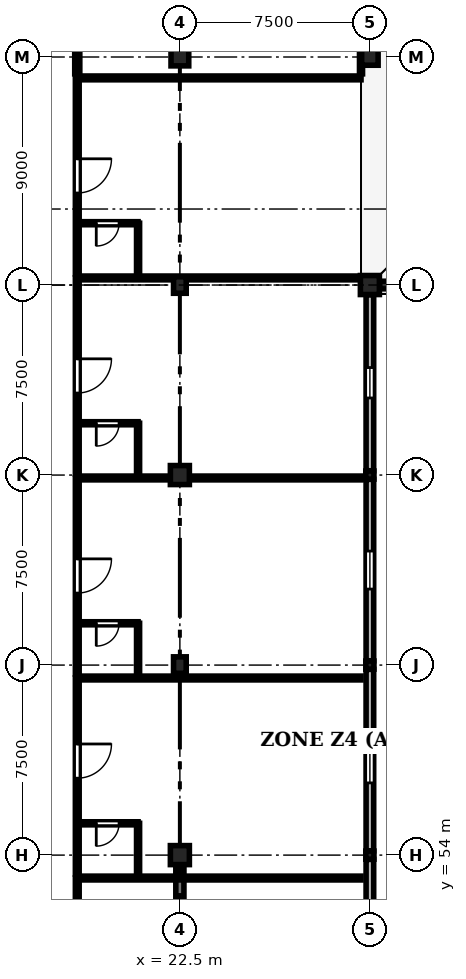
"""IFC4 building model, lengths in metres.
Left out: names, types, materials, properties, quantities, classifications, styles, units other than length and angle.
Written with IfcOpenShell. Run it as: python <this file> out.ifc"""

import sys

from ifc_helpers import new_model, si_unit, direction, frame, frame_2d, origin, origin_2d, place, context, subcontext, project, spatial, rectangle, extrude, element, fill, save


model = new_model("IFC4")
c1 = context("Model", 3, precision=1e-05, world=origin(), true_north=direction((0.0, 1.0)))
c2 = subcontext(c1, "Body", "Model", "MODEL_VIEW")
j1 = project(units=[si_unit("LENGTHUNIT", "METRE"), si_unit("PLANEANGLEUNIT", "RADIAN")], contexts=[c1])
p1 = place(None, origin())
s1 = spatial("IfcSite", under=j1, at=p1, CompositionType="ELEMENT")
p2 = place(p1, origin())
s2 = spatial("IfcBuilding", under=s1, at=p2, CompositionType="ELEMENT")
p3 = place(p2, frame((0.0, 0.0, 14.1)))
s3 = spatial("IfcBuildingStorey", under=s2, at=p3, CompositionType="ELEMENT", Elevation=14.1)
p4 = place(p3, frame((22.5, 54.0, 0.0), z_axis=(0.0, 0.0, 1.0), x_axis=(1.0, 0.0, 0.0)))
e1 = element("IfcColumn", 1, at=p4, inside=s3, PredefinedType="COLUMN", context=c2, shape_type="SweptSolid", body=[
    extrude(rectangle(XDim=0.75, YDim=0.75, at=origin_2d()), origin(), (0.0, 0.0, 1.0), 3.75),
])
p5 = place(p3, frame((22.5, 61.5, 0.0), z_axis=(0.0, 0.0, 1.0), x_axis=(1.0, 0.0, 0.0)))
e2 = element("IfcColumn", 2, at=p5, inside=s3, PredefinedType="COLUMN", context=c2, shape_type="SweptSolid", body=[
    extrude(rectangle(XDim=0.5, YDim=0.65, at=origin_2d()), origin(), (0.0, 0.0, 1.0), 3.75),
])
p6 = place(p3, frame((22.5, 69.0, 0.0), z_axis=(0.0, 0.0, 1.0), x_axis=(1.0, 0.0, 0.0)))
e3 = element("IfcColumn", 3, at=p6, inside=s3, PredefinedType="COLUMN", context=c2, shape_type="SweptSolid", body=[
    extrude(rectangle(XDim=0.75, YDim=0.75, at=origin_2d()), origin(), (0.0, 0.0, 1.0), 3.75),
])
p7 = place(p3, frame((22.5, 76.5, 0.0), z_axis=(0.0, 0.0, 1.0), x_axis=(1.0, 0.0, 0.0)))
e4 = element("IfcColumn", 4, at=p7, inside=s3, PredefinedType="COLUMN", context=c2, shape_type="SweptSolid", body=[
    extrude(rectangle(XDim=0.5, YDim=0.65, at=origin_2d()), origin(), (0.0, 0.0, 1.0), 3.75),
])
p8 = place(p3, frame((22.5, 85.5, 0.0), z_axis=(0.0, 0.0, 1.0), x_axis=(1.0, 0.0, 0.0)))
e5 = element("IfcColumn", 5, at=p8, inside=s3, PredefinedType="COLUMN", context=c2, shape_type="SweptSolid", body=[
    extrude(rectangle(XDim=0.7, YDim=0.7, at=origin_2d()), origin(), (0.0, 0.0, 1.0), 3.75),
])
for number, where, z_axis, x_axis in (
    (6, (30.0, 54.0, 0.0), (0.0, 0.0, 1.0), (1.0, 0.0, 0.0)),
    (7, (30.0, 61.5, 0.0), (0.0, 0.0, 1.0), (1.0, 0.0, 0.0)),
    (8, (30.0, 69.0, 0.0), (0.0, 0.0, 1.0), (1.0, 0.0, 0.0)),
):
    element("IfcColumn", number, at=place(p3, frame(where, z_axis=z_axis, x_axis=x_axis)), inside=s3, PredefinedType="COLUMN", context=c2, shape_type="SweptSolid", body=[
        extrude(rectangle(XDim=0.32, YDim=0.32, at=origin_2d()), origin(), (0.0, 0.0, 1.0), 3.75),
    ])
p9 = place(p3, frame((30.0, 76.5, 0.0), z_axis=(0.0, 0.0, 1.0), x_axis=(1.0, 0.0, 0.0)))
e9 = element("IfcColumn", 9, at=p9, inside=s3, PredefinedType="COLUMN", context=c2, shape_type="SweptSolid", body=[
    extrude(rectangle(XDim=0.75, YDim=0.75, at=origin_2d()), origin(), (0.0, 0.0, 1.0), 3.75),
])
p10 = place(p3, frame((30.0, 85.5, 0.0), z_axis=(0.0, 0.0, 1.0), x_axis=(1.0, 0.0, 0.0)))
e10 = element("IfcColumn", 10, at=p10, inside=s3, PredefinedType="COLUMN", context=c2, shape_type="SweptSolid", body=[
    extrude(rectangle(XDim=0.65, YDim=0.65, at=origin_2d()), origin(), (0.0, 0.0, 1.0), 3.75),
])
p11 = place(p3, frame((22.5, 46.95, 0.0), z_axis=(0.0, 0.0, 1.0), x_axis=(0.0, 1.0, 0.0)))
e11 = element("IfcWall", 11, at=p11, inside=s3, PredefinedType="SHEAR", context=c2, shape_type="SweptSolid", body=[
    extrude(rectangle(XDim=6.6, YDim=0.32, at=frame_2d((3.3, 0.0))), origin(), (0.0, 0.0, 1.0), 2.92),
])
p12 = place(p3, frame((30.0, 53.83, 0.0), z_axis=(0.0, 0.0, 1.0), x_axis=(0.0, -1.0, 0.0)))
e12 = element("IfcWall", 12, at=p12, inside=s3, PredefinedType="STANDARD", context=c2, shape_type="SweptSolid", body=[
    extrude(rectangle(XDim=7.16, YDim=0.3, at=frame_2d((3.58, 0.0))), origin(), (0.0, 0.0, 1.0), 2.87),
])
p13 = place(p12, frame((2.38, 0.0, 0.9)))
e13 = element("IfcOpeningElement", 13, at=p13, cuts=e12, PredefinedType="OPENING", context=c2, shape_type="SweptSolid", body=[
    extrude(rectangle(XDim=2.4, YDim=1.69, at=frame_2d((1.2, 0.845))), frame((0.0, 0.16, 0.0), z_axis=(0.0, -1.0, 0.0), x_axis=(1.0, 0.0, 0.0)), (0.0, 0.0, 1.0), 0.32),
])
p14 = place(p3, frame((30.0, 61.33, 0.0), z_axis=(0.0, 0.0, 1.0), x_axis=(0.0, -1.0, 0.0)))
e14 = element("IfcWall", 14, at=p14, inside=s3, PredefinedType="STANDARD", context=c2, shape_type="SweptSolid", body=[
    extrude(rectangle(XDim=7.16, YDim=0.3, at=frame_2d((3.58, 0.0))), origin(), (0.0, 0.0, 1.0), 2.87),
])
p15 = place(p14, frame((2.68, 0.0, 0.9)))
e15 = element("IfcOpeningElement", 15, at=p15, cuts=e14, PredefinedType="OPENING", context=c2, shape_type="SweptSolid", body=[
    extrude(rectangle(XDim=1.8, YDim=1.69, at=frame_2d((0.9, 0.845))), frame((0.0, 0.16, 0.0), z_axis=(0.0, -1.0, 0.0), x_axis=(1.0, 0.0, 0.0)), (0.0, 0.0, 1.0), 0.32),
])
p16 = place(p3, frame((30.0, 68.83, 0.0), z_axis=(0.0, 0.0, 1.0), x_axis=(0.0, -1.0, 0.0)))
e16 = element("IfcWall", 16, at=p16, inside=s3, PredefinedType="STANDARD", context=c2, shape_type="SweptSolid", body=[
    extrude(rectangle(XDim=7.16, YDim=0.3, at=frame_2d((3.58, 0.0))), origin(), (0.0, 0.0, 1.0), 2.87),
])
p17 = place(p16, frame((2.83, 0.0, 0.9)))
e17 = element("IfcOpeningElement", 17, at=p17, cuts=e16, PredefinedType="OPENING", context=c2, shape_type="SweptSolid", body=[
    extrude(rectangle(XDim=1.5, YDim=1.69, at=frame_2d((0.75, 0.845))), frame((0.0, 0.16, 0.0), z_axis=(0.0, -1.0, 0.0), x_axis=(1.0, 0.0, 0.0)), (0.0, 0.0, 1.0), 0.32),
])
p18 = place(p3, frame((30.0, 76.115, 0.0), z_axis=(0.0, 0.0, 1.0), x_axis=(0.0, -1.0, 0.0)))
e18 = element("IfcWall", 18, at=p18, inside=s3, PredefinedType="STANDARD", context=c2, shape_type="SweptSolid", body=[
    extrude(rectangle(XDim=6.945, YDim=0.3, at=frame_2d((3.473, 0.0))), origin(), (0.0, 0.0, 1.0), 2.87),
])
p19 = place(p18, frame((2.873, 0.0, 0.9)))
e19 = element("IfcOpeningElement", 19, at=p19, cuts=e18, PredefinedType="OPENING", context=c2, shape_type="SweptSolid", body=[
    extrude(rectangle(XDim=1.2, YDim=1.69, at=frame_2d((0.6, 0.845))), frame((0.0, 0.16, 0.0), z_axis=(0.0, -1.0, 0.0), x_axis=(1.0, 0.0, 0.0)), (0.0, 0.0, 1.0), 0.32),
])
p20 = place(p3, frame((37.265, 76.5, 0.0), z_axis=(0.0, 0.0, 1.0), x_axis=(-1.0, 0.0, 0.0)))
e20 = element("IfcWall", 20, at=p20, inside=s3, PredefinedType="STANDARD", context=c2, shape_type="SweptSolid", body=[
    extrude(rectangle(XDim=6.88, YDim=0.3, at=frame_2d((3.44, 0.0))), origin(), (0.0, 0.0, 1.0), 3.47),
])
p21 = place(p20, frame((2.24, 0.0, 1.1)))
e21 = element("IfcOpeningElement", 21, at=p21, cuts=e20, PredefinedType="OPENING", context=c2, shape_type="SweptSolid", body=[
    extrude(rectangle(XDim=2.4, YDim=1.2, at=frame_2d((1.2, 0.6))), frame((0.0, 0.16, 0.0), z_axis=(0.0, -1.0, 0.0), x_axis=(1.0, 0.0, 0.0)), (0.0, 0.0, 1.0), 0.32),
])
p22 = place(p3, frame((18.45, 53.095, 0.0), z_axis=(0.0, 0.0, 1.0), x_axis=(0.0, -1.0, 0.0)))
e22 = element("IfcWall", 22, at=p22, inside=s3, PredefinedType="PARTITIONING", context=c2, shape_type="SweptSolid", body=[
    extrude(rectangle(XDim=7.735, YDim=0.15, at=frame_2d((3.867, 0.0))), origin(), (0.0, 0.0, 1.0), 3.455),
])
p23 = place(p22, frame((2.015, 0.0, 0.0)))
e23 = element("IfcOpeningElement", 23, at=p23, cuts=e22, PredefinedType="OPENING", context=c2, shape_type="SweptSolid", body=[
    extrude(rectangle(XDim=1.35, YDim=2.25, at=frame_2d((0.675, 1.125))), frame((0.0, 0.085, 0.0), z_axis=(0.0, -1.0, 0.0), x_axis=(1.0, 0.0, 0.0)), (0.0, 0.0, 1.0), 0.17),
])
p24 = place(p3, frame((18.45, 60.99, 0.0), z_axis=(0.0, 0.0, 1.0), x_axis=(0.0, -1.0, 0.0)))
e24 = element("IfcWall", 24, at=p24, inside=s3, PredefinedType="PARTITIONING", context=c2, shape_type="SweptSolid", body=[
    extrude(rectangle(XDim=7.735, YDim=0.15, at=frame_2d((3.868, 0.0))), origin(), (0.0, 0.0, 1.0), 3.455),
])
p25 = place(p24, frame((2.604, 0.0, 0.0)))
e25 = element("IfcOpeningElement", 25, at=p25, cuts=e24, PredefinedType="OPENING", context=c2, shape_type="SweptSolid", body=[
    extrude(rectangle(XDim=1.35, YDim=2.25, at=frame_2d((0.675, 1.125))), frame((0.0, 0.085, 0.0), z_axis=(0.0, -1.0, 0.0), x_axis=(1.0, 0.0, 0.0)), (0.0, 0.0, 1.0), 0.17),
])
p26 = place(p3, frame((20.85, 55.255, 0.0), z_axis=(0.0, 0.0, 1.0), x_axis=(-1.0, 0.0, 0.0)))
e26 = element("IfcWall", 26, at=p26, inside=s3, PredefinedType="PARTITIONING", context=c2, shape_type="SweptSolid", body=[
    extrude(rectangle(XDim=2.4, YDim=0.12, at=frame_2d((1.2, 0.0))), origin(), (0.0, 0.0, 1.0), 3.455),
])
p27 = place(p26, frame((0.75, 0.0, 0.0)))
e27 = element("IfcOpeningElement", 27, at=p27, cuts=e26, PredefinedType="OPENING", context=c2, shape_type="SweptSolid", body=[
    extrude(rectangle(XDim=0.9, YDim=2.1, at=frame_2d((0.45, 1.05))), frame((0.0, 0.07, 0.0), z_axis=(0.0, -1.0, 0.0), x_axis=(1.0, 0.0, 0.0)), (0.0, 0.0, 1.0), 0.14),
])
p28 = place(p3, frame((20.85, 53.255, 0.0), z_axis=(0.0, 0.0, 1.0), x_axis=(0.0, 1.0, 0.0)))
e28 = element("IfcWall", 28, at=p28, inside=s3, PredefinedType="PARTITIONING", context=c2, shape_type="SweptSolid", body=[
    extrude(rectangle(XDim=2.0, YDim=0.12, at=frame_2d((1.0, 0.0))), origin(), (0.0, 0.0, 1.0), 3.455),
])
p29 = place(p3, frame((18.45, 68.885, 0.0), z_axis=(0.0, 0.0, 1.0), x_axis=(0.0, -1.0, 0.0)))
e29 = element("IfcWall", 29, at=p29, inside=s3, PredefinedType="PARTITIONING", context=c2, shape_type="SweptSolid", body=[
    extrude(rectangle(XDim=7.735, YDim=0.15, at=frame_2d((3.868, 0.0))), origin(), (0.0, 0.0, 1.0), 3.455),
])
p30 = place(p29, frame((3.192, 0.0, 0.0)))
e30 = element("IfcOpeningElement", 30, at=p30, cuts=e29, PredefinedType="OPENING", context=c2, shape_type="SweptSolid", body=[
    extrude(rectangle(XDim=1.35, YDim=2.25, at=frame_2d((0.675, 1.125))), frame((0.0, 0.085, 0.0), z_axis=(0.0, -1.0, 0.0), x_axis=(1.0, 0.0, 0.0)), (0.0, 0.0, 1.0), 0.17),
])
p31 = place(p3, frame((20.85, 63.15, 0.0), z_axis=(0.0, 0.0, 1.0), x_axis=(-1.0, 0.0, 0.0)))
e31 = element("IfcWall", 31, at=p31, inside=s3, PredefinedType="PARTITIONING", context=c2, shape_type="SweptSolid", body=[
    extrude(rectangle(XDim=2.4, YDim=0.12, at=frame_2d((1.2, 0.0))), origin(), (0.0, 0.0, 1.0), 3.455),
])
p32 = place(p31, frame((0.75, 0.0, 0.0)))
e32 = element("IfcOpeningElement", 32, at=p32, cuts=e31, PredefinedType="OPENING", context=c2, shape_type="SweptSolid", body=[
    extrude(rectangle(XDim=0.9, YDim=2.1, at=frame_2d((0.45, 1.05))), frame((0.0, 0.07, 0.0), z_axis=(0.0, -1.0, 0.0), x_axis=(1.0, 0.0, 0.0)), (0.0, 0.0, 1.0), 0.14),
])
p33 = place(p3, frame((20.85, 61.15, 0.0), z_axis=(0.0, 0.0, 1.0), x_axis=(0.0, 1.0, 0.0)))
e33 = element("IfcWall", 33, at=p33, inside=s3, PredefinedType="PARTITIONING", context=c2, shape_type="SweptSolid", body=[
    extrude(rectangle(XDim=2.0, YDim=0.12, at=frame_2d((1.0, 0.0))), origin(), (0.0, 0.0, 1.0), 3.455),
])
p34 = place(p3, frame((18.45, 76.78, 0.0), z_axis=(0.0, 0.0, 1.0), x_axis=(0.0, -1.0, 0.0)))
e34 = element("IfcWall", 34, at=p34, inside=s3, PredefinedType="PARTITIONING", context=c2, shape_type="SweptSolid", body=[
    extrude(rectangle(XDim=7.735, YDim=0.15, at=frame_2d((3.868, 0.0))), origin(), (0.0, 0.0, 1.0), 3.455),
])
p35 = place(p34, frame((3.192, 0.0, 0.0)))
e35 = element("IfcOpeningElement", 35, at=p35, cuts=e34, PredefinedType="OPENING", context=c2, shape_type="SweptSolid", body=[
    extrude(rectangle(XDim=1.35, YDim=2.25, at=frame_2d((0.675, 1.125))), frame((0.0, 0.085, 0.0), z_axis=(0.0, -1.0, 0.0), x_axis=(1.0, 0.0, 0.0)), (0.0, 0.0, 1.0), 0.17),
])
p36 = place(p3, frame((20.85, 71.045, 0.0), z_axis=(0.0, 0.0, 1.0), x_axis=(-1.0, 0.0, 0.0)))
e36 = element("IfcWall", 36, at=p36, inside=s3, PredefinedType="PARTITIONING", context=c2, shape_type="SweptSolid", body=[
    extrude(rectangle(XDim=2.4, YDim=0.12, at=frame_2d((1.2, 0.0))), origin(), (0.0, 0.0, 1.0), 3.455),
])
p37 = place(p36, frame((0.75, 0.0, 0.0)))
e37 = element("IfcOpeningElement", 37, at=p37, cuts=e36, PredefinedType="OPENING", context=c2, shape_type="SweptSolid", body=[
    extrude(rectangle(XDim=0.9, YDim=2.1, at=frame_2d((0.45, 1.05))), frame((0.0, 0.07, 0.0), z_axis=(0.0, -1.0, 0.0), x_axis=(1.0, 0.0, 0.0)), (0.0, 0.0, 1.0), 0.14),
])
p38 = place(p3, frame((20.85, 69.045, 0.0), z_axis=(0.0, 0.0, 1.0), x_axis=(0.0, 1.0, 0.0)))
e38 = element("IfcWall", 38, at=p38, inside=s3, PredefinedType="PARTITIONING", context=c2, shape_type="SweptSolid", body=[
    extrude(rectangle(XDim=2.0, YDim=0.12, at=frame_2d((1.0, 0.0))), origin(), (0.0, 0.0, 1.0), 3.455),
])
p39 = place(p3, frame((18.45, 84.675, 0.0), z_axis=(0.0, 0.0, 1.0), x_axis=(0.0, -1.0, 0.0)))
e39 = element("IfcWall", 39, at=p39, inside=s3, PredefinedType="PARTITIONING", context=c2, shape_type="SweptSolid", body=[
    extrude(rectangle(XDim=7.735, YDim=0.15, at=frame_2d((3.868, 0.0))), origin(), (0.0, 0.0, 1.0), 3.055),
])
p40 = place(p39, frame((3.192, 0.0, 0.0)))
e40 = element("IfcOpeningElement", 40, at=p40, cuts=e39, PredefinedType="OPENING", context=c2, shape_type="SweptSolid", body=[
    extrude(rectangle(XDim=1.35, YDim=2.25, at=frame_2d((0.675, 1.125))), frame((0.0, 0.085, 0.0), z_axis=(0.0, -1.0, 0.0), x_axis=(1.0, 0.0, 0.0)), (0.0, 0.0, 1.0), 0.17),
])
p41 = place(p3, frame((20.85, 78.94, 0.0), z_axis=(0.0, 0.0, 1.0), x_axis=(-1.0, 0.0, 0.0)))
e41 = element("IfcWall", 41, at=p41, inside=s3, PredefinedType="PARTITIONING", context=c2, shape_type="SweptSolid", body=[
    extrude(rectangle(XDim=2.4, YDim=0.12, at=frame_2d((1.2, 0.0))), origin(), (0.0, 0.0, 1.0), 3.455),
])
p42 = place(p41, frame((0.75, 0.0, 0.0)))
e42 = element("IfcOpeningElement", 42, at=p42, cuts=e41, PredefinedType="OPENING", context=c2, shape_type="SweptSolid", body=[
    extrude(rectangle(XDim=0.9, YDim=2.1, at=frame_2d((0.45, 1.05))), frame((0.0, 0.07, 0.0), z_axis=(0.0, -1.0, 0.0), x_axis=(1.0, 0.0, 0.0)), (0.0, 0.0, 1.0), 0.14),
])
p43 = place(p3, frame((20.85, 76.94, 0.0), z_axis=(0.0, 0.0, 1.0), x_axis=(0.0, 1.0, 0.0)))
e43 = element("IfcWall", 43, at=p43, inside=s3, PredefinedType="PARTITIONING", context=c2, shape_type="SweptSolid", body=[
    extrude(rectangle(XDim=2.0, YDim=0.12, at=frame_2d((1.0, 0.0))), origin(), (0.0, 0.0, 1.0), 3.455),
])
p44 = place(p3, frame((18.45, 92.57, 0.0), z_axis=(0.0, 0.0, 1.0), x_axis=(0.0, -1.0, 0.0)))
e44 = element("IfcWall", 44, at=p44, inside=s3, PredefinedType="STANDARD", context=c2, shape_type="SweptSolid", body=[
    extrude(rectangle(XDim=7.735, YDim=0.2, at=frame_2d((3.868, 0.0))), origin(), (0.0, 0.0, 1.0), 3.055),
])
p45 = place(p44, frame((2.764, 0.0, 0.0)))
e45 = element("IfcOpeningElement", 45, at=p45, cuts=e44, PredefinedType="OPENING", context=c2, shape_type="SweptSolid", body=[
    extrude(rectangle(XDim=0.95, YDim=2.15, at=frame_2d((0.475, 1.075))), frame((0.0, 0.11, 0.0), z_axis=(0.0, -1.0, 0.0), x_axis=(1.0, 0.0, 0.0)), (0.0, 0.0, 1.0), 0.22),
])
for number, where, z_axis, x_axis in (
    (46, (18.45, 53.095, 0.0), (0.0, 0.0, 1.0), (1.0, 0.0, 0.0)),
    (47, (18.45, 60.99, 0.0), (0.0, 0.0, 1.0), (1.0, 0.0, 0.0)),
):
    element("IfcWall", number, at=place(p3, frame(where, z_axis=z_axis, x_axis=x_axis)), inside=s3, PredefinedType="PARTITIONING", context=c2, shape_type="SweptSolid", body=[
        extrude(rectangle(XDim=11.2, YDim=0.15, at=frame_2d((5.6, 0.0))), origin(), (0.0, 0.0, 1.0), 3.455),
    ])
for number, where, z_axis, x_axis in (
    (48, (18.45, 68.885, 0.0), (0.0, 0.0, 1.0), (1.0, 0.0, 0.0)),
    (49, (18.45, 76.78, 0.0), (0.0, 0.0, 1.0), (1.0, 0.0, 0.0)),
):
    element("IfcWall", number, at=place(p3, frame(where, z_axis=z_axis, x_axis=x_axis)), inside=s3, PredefinedType="PARTITIONING", context=c2, shape_type="SweptSolid", body=[
        extrude(rectangle(XDim=11.2, YDim=0.15, at=frame_2d((5.6, 0.0))), origin(), (0.0, 0.0, 1.0), 2.855),
    ])
p46 = place(p3, frame((18.45, 84.675, 0.0), z_axis=(0.0, 0.0, 1.0), x_axis=(1.0, 0.0, 0.0)))
e50 = element("IfcWall", 50, at=p46, inside=s3, PredefinedType="PARTITIONING", context=c2, shape_type="SweptSolid", body=[
    extrude(rectangle(XDim=11.2, YDim=0.15, at=frame_2d((5.6, 0.0))), origin(), (0.0, 0.0, 1.0), 3.455),
])
p47 = place(p3, frame((29.65, 84.835, 0.0), z_axis=(0.0, 0.0, 1.0), x_axis=(0.0, 1.0, 0.0)))
e51 = element("IfcWall", 51, at=p47, inside=s3, PredefinedType="PARTITIONING", context=c2, shape_type="SweptSolid", body=[
    extrude(rectangle(XDim=7.735, YDim=0.12, at=frame_2d((3.868, 0.0))), origin(), (0.0, 0.0, 1.0), 2.855),
])
p48 = place(p15, origin())
e52 = element("IfcWindow", 52, at=p48, inside=s3, PartitioningType="SINGLE_PANEL", PredefinedType="WINDOW", context=c2, shape_type="SweptSolid", body=[
    extrude(rectangle(XDim=1.8, YDim=1.69, at=frame_2d((0.9, 0.845))), frame((0.0, 0.03, 0.0), z_axis=(0.0, -1.0, 0.0), x_axis=(1.0, 0.0, 0.0)), (0.0, 0.0, 1.0), 0.06),
])
fill(e15, e52)
p49 = place(p17, origin())
e53 = element("IfcWindow", 53, at=p49, inside=s3, PartitioningType="SINGLE_PANEL", PredefinedType="WINDOW", context=c2, shape_type="SweptSolid", body=[
    extrude(rectangle(XDim=1.5, YDim=1.69, at=frame_2d((0.75, 0.845))), frame((0.0, 0.03, 0.0), z_axis=(0.0, -1.0, 0.0), x_axis=(1.0, 0.0, 0.0)), (0.0, 0.0, 1.0), 0.06),
])
fill(e17, e53)
p50 = place(p19, origin())
e54 = element("IfcWindow", 54, at=p50, inside=s3, PartitioningType="SINGLE_PANEL", PredefinedType="WINDOW", context=c2, shape_type="SweptSolid", body=[
    extrude(rectangle(XDim=1.2, YDim=1.69, at=frame_2d((0.6, 0.845))), frame((0.0, 0.03, 0.0), z_axis=(0.0, -1.0, 0.0), x_axis=(1.0, 0.0, 0.0)), (0.0, 0.0, 1.0), 0.06),
])
fill(e19, e54)
p51 = place(p25, origin())
e55 = element("IfcDoor", 55, at=p51, inside=s3, OperationType="SINGLE_SWING_LEFT", PredefinedType="DOOR", context=c2, shape_type="SweptSolid", body=[
    extrude(rectangle(XDim=1.35, YDim=2.25, at=frame_2d((0.675, 1.125))), frame((0.0, 0.025, 0.0), z_axis=(0.0, -1.0, 0.0), x_axis=(1.0, 0.0, 0.0)), (0.0, 0.0, 1.0), 0.05),
])
fill(e25, e55)
p52 = place(p27, origin())
e56 = element("IfcDoor", 56, at=p52, inside=s3, OperationType="SINGLE_SWING_RIGHT", PredefinedType="DOOR", context=c2, shape_type="SweptSolid", body=[
    extrude(rectangle(XDim=0.9, YDim=2.1, at=frame_2d((0.45, 1.05))), frame((0.0, 0.025, 0.0), z_axis=(0.0, -1.0, 0.0), x_axis=(1.0, 0.0, 0.0)), (0.0, 0.0, 1.0), 0.05),
])
fill(e27, e56)
p53 = place(p30, origin())
e57 = element("IfcDoor", 57, at=p53, inside=s3, OperationType="SINGLE_SWING_LEFT", PredefinedType="DOOR", context=c2, shape_type="SweptSolid", body=[
    extrude(rectangle(XDim=1.35, YDim=2.25, at=frame_2d((0.675, 1.125))), frame((0.0, 0.025, 0.0), z_axis=(0.0, -1.0, 0.0), x_axis=(1.0, 0.0, 0.0)), (0.0, 0.0, 1.0), 0.05),
])
fill(e30, e57)
p54 = place(p32, origin())
e58 = element("IfcDoor", 58, at=p54, inside=s3, OperationType="SINGLE_SWING_RIGHT", PredefinedType="DOOR", context=c2, shape_type="SweptSolid", body=[
    extrude(rectangle(XDim=0.9, YDim=2.1, at=frame_2d((0.45, 1.05))), frame((0.0, 0.025, 0.0), z_axis=(0.0, -1.0, 0.0), x_axis=(1.0, 0.0, 0.0)), (0.0, 0.0, 1.0), 0.05),
])
fill(e32, e58)
p55 = place(p35, origin())
e59 = element("IfcDoor", 59, at=p55, inside=s3, OperationType="SINGLE_SWING_LEFT", PredefinedType="DOOR", context=c2, shape_type="SweptSolid", body=[
    extrude(rectangle(XDim=1.35, YDim=2.25, at=frame_2d((0.675, 1.125))), frame((0.0, 0.025, 0.0), z_axis=(0.0, -1.0, 0.0), x_axis=(1.0, 0.0, 0.0)), (0.0, 0.0, 1.0), 0.05),
])
fill(e35, e59)
p56 = place(p37, origin())
e60 = element("IfcDoor", 60, at=p56, inside=s3, OperationType="SINGLE_SWING_RIGHT", PredefinedType="DOOR", context=c2, shape_type="SweptSolid", body=[
    extrude(rectangle(XDim=0.9, YDim=2.1, at=frame_2d((0.45, 1.05))), frame((0.0, 0.025, 0.0), z_axis=(0.0, -1.0, 0.0), x_axis=(1.0, 0.0, 0.0)), (0.0, 0.0, 1.0), 0.05),
])
fill(e37, e60)
p57 = place(p40, origin())
e61 = element("IfcDoor", 61, at=p57, inside=s3, OperationType="SINGLE_SWING_LEFT", PredefinedType="DOOR", context=c2, shape_type="SweptSolid", body=[
    extrude(rectangle(XDim=1.35, YDim=2.25, at=frame_2d((0.675, 1.125))), frame((0.0, 0.025, 0.0), z_axis=(0.0, -1.0, 0.0), x_axis=(1.0, 0.0, 0.0)), (0.0, 0.0, 1.0), 0.05),
])
fill(e40, e61)
p58 = place(p42, origin())
e62 = element("IfcDoor", 62, at=p58, inside=s3, OperationType="SINGLE_SWING_RIGHT", PredefinedType="DOOR", context=c2, shape_type="SweptSolid", body=[
    extrude(rectangle(XDim=0.9, YDim=2.1, at=frame_2d((0.45, 1.05))), frame((0.0, 0.025, 0.0), z_axis=(0.0, -1.0, 0.0), x_axis=(1.0, 0.0, 0.0)), (0.0, 0.0, 1.0), 0.05),
])
fill(e42, e62)
save(model, sys.argv[1])
